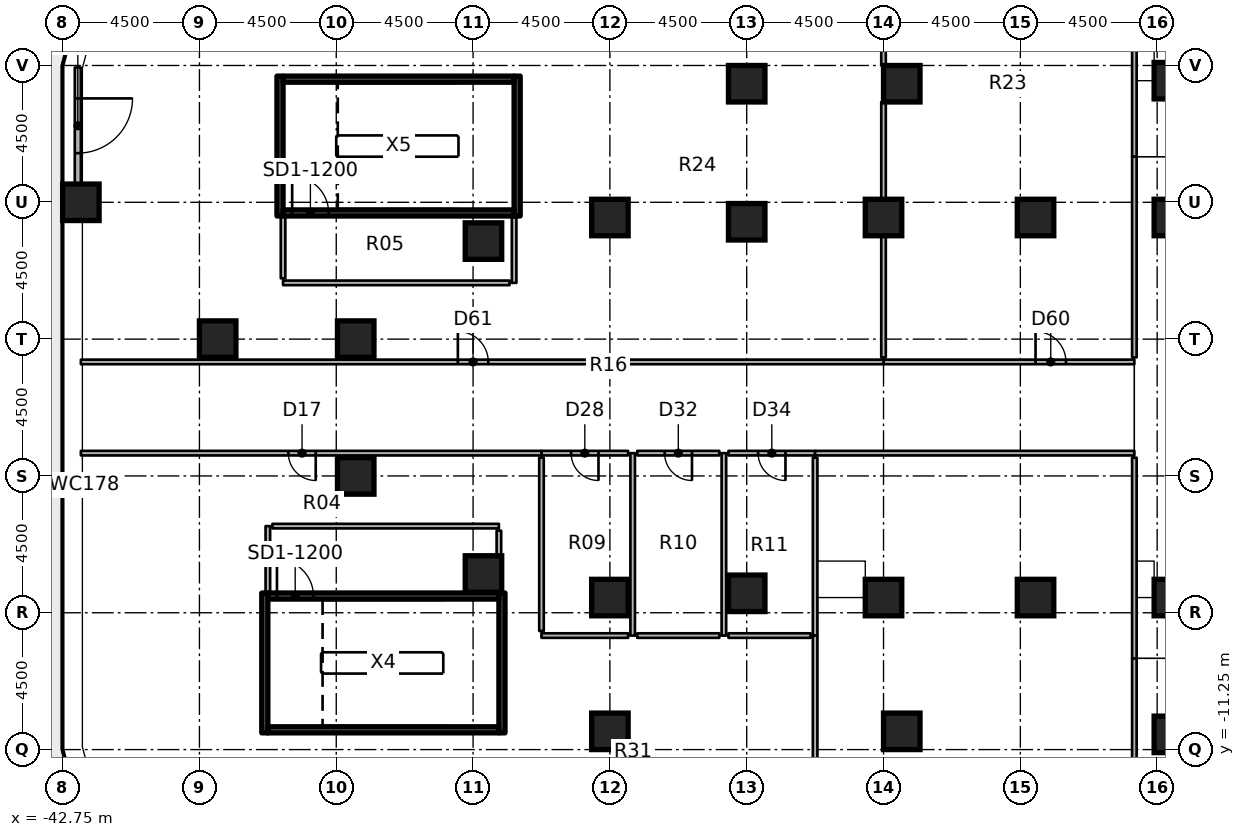
"""IFC4 building model, lengths in metres.
Left out: names, types, materials, properties, quantities, classifications, styles, units other than length and angle.
Written with IfcOpenShell. Run it as: python <this file> out.ifc"""

import sys

from ifc_helpers import new_model, si_unit, direction, frame, frame_2d, origin, origin_2d, place, context, subcontext, project, spatial, rectangle, extrude, element, fill, save


model = new_model("IFC4")
c1 = context("Model", 3, precision=1e-05, world=origin(), true_north=direction((0.0, 1.0)))
c2 = subcontext(c1, "Body", "Model", "MODEL_VIEW")
j1 = project(units=[si_unit("LENGTHUNIT", "METRE"), si_unit("PLANEANGLEUNIT", "RADIAN")], contexts=[c1])
p1 = place(None, origin())
s1 = spatial("IfcSite", under=j1, at=p1, CompositionType="ELEMENT")
p2 = place(p1, origin())
s2 = spatial("IfcBuilding", under=s1, at=p2, CompositionType="ELEMENT")
p3 = place(p2, frame((0.0, 0.0, 17.0)))
s3 = spatial("IfcBuildingStorey", under=s2, at=p3, CompositionType="ELEMENT", Elevation=17.0)
for number, where, z_axis, x_axis in (
    (1, (-42.15, 6.75, 0.0), (0.0, 0.0, 1.0), (1.0, 0.0, 0.0)),
    (2, (-37.65, 2.25, 0.0), (0.0, 0.0, 1.0), (1.0, 0.0, 0.0)),
    (3, (-33.11, -2.25, 0.0), (0.0, 0.0, 1.0), (1.0, 0.0, 0.0)),
    (4, (-33.11, 2.25, 0.0), (0.0, 0.0, 1.0), (1.0, 0.0, 0.0)),
    (5, (-28.908, -5.475, 0.0), (0.0, 0.0, 1.0), (1.0, 0.0, 0.0)),
    (6, (-28.908, 5.475, 0.0), (0.0, 0.0, 1.0), (1.0, 0.0, 0.0)),
    (7, (-24.75, -10.65, 0.0), (0.0, 0.0, 1.0), (1.0, 0.0, 0.0)),
    (8, (-24.75, -6.25, 0.0), (0.0, 0.0, 1.0), (1.0, 0.0, 0.0)),
    (9, (-24.75, 6.25, 0.0), (0.0, 0.0, 1.0), (1.0, 0.0, 0.0)),
    (10, (-20.25, -6.11, 0.0), (0.0, 0.0, 1.0), (1.0, 0.0, 0.0)),
    (11, (-20.25, 6.11, 0.0), (0.0, 0.0, 1.0), (1.0, 0.0, 0.0)),
    (12, (-20.25, 10.65, 0.0), (0.0, 0.0, 1.0), (1.0, 0.0, 0.0)),
    (13, (-15.15, -10.65, 0.0), (0.0, 0.0, 1.0), (1.0, 0.0, 0.0)),
    (14, (-15.75, -6.25, 0.0), (0.0, 0.0, 1.0), (1.0, 0.0, 0.0)),
    (15, (-15.75, 6.25, 0.0), (0.0, 0.0, 1.0), (1.0, 0.0, 0.0)),
    (16, (-15.15, 10.65, 0.0), (0.0, 0.0, 1.0), (1.0, 0.0, 0.0)),
    (17, (-10.75, -6.25, 0.0), (0.0, 0.0, 1.0), (1.0, 0.0, 0.0)),
    (18, (-10.75, 6.25, 0.0), (0.0, 0.0, 1.0), (1.0, 0.0, 0.0)),
    (19, (-6.25, -10.75, 0.0), (0.0, 0.0, 1.0), (1.0, 0.0, 0.0)),
    (20, (-6.25, -6.25, 0.0), (0.0, 0.0, 1.0), (1.0, 0.0, 0.0)),
    (21, (-6.25, 6.25, 0.0), (0.0, 0.0, 1.0), (1.0, 0.0, 0.0)),
    (22, (-6.25, 10.75, 0.0), (0.0, 0.0, 1.0), (1.0, 0.0, 0.0)),
):
    element("IfcColumn", number, at=place(p3, frame(where, z_axis=z_axis, x_axis=x_axis)), inside=s3, PredefinedType="COLUMN", context=c2, shape_type="SweptSolid", body=[
        extrude(rectangle(XDim=1.2, YDim=1.2, at=origin_2d()), origin(), (0.0, 0.0, 1.0), 4.55),
    ])
p4 = place(p3, frame((-42.25, 11.184, 0.0), z_axis=(0.0, 0.0, 1.0), x_axis=(0.0, -1.0, 0.0)))
e23 = element("IfcWall", 23, at=p4, inside=s3, PredefinedType="SOLIDWALL", context=c2, shape_type="SweptSolid", body=[
    extrude(rectangle(XDim=3.834, YDim=0.2, at=frame_2d((1.917, 0.0))), origin(), (0.0, 0.0, 1.0), 4.55),
])
p5 = place(p4, frame((1.017, 0.0, 0.0)))
e24 = element("IfcOpeningElement", 24, at=p5, cuts=e23, PredefinedType="OPENING", context=c2, shape_type="SweptSolid", body=[
    extrude(rectangle(XDim=1.8, YDim=2.4, at=frame_2d((0.9, 1.2))), frame((0.0, 0.11, 0.0), z_axis=(0.0, -1.0, 0.0), x_axis=(1.0, 0.0, 0.0)), (0.0, 0.0, 1.0), 0.22),
])
for number, where, z_axis, x_axis in (
    (25, (-36.1, -10.7, 0.0), (0.0, 0.0, 1.0), (0.0, 1.0, 0.0)),
    (26, (-28.3, -10.7, 0.0), (0.0, 0.0, 1.0), (0.0, 1.0, 0.0)),
):
    element("IfcWall", number, at=place(p3, frame(where, z_axis=z_axis, x_axis=x_axis)), inside=s3, PredefinedType="SHEAR", context=c2, shape_type="SweptSolid", body=[
        extrude(rectangle(XDim=4.6, YDim=0.2, at=frame_2d((2.3, 0.0))), origin(), (0.0, 0.0, 1.0), 4.55),
    ])
p6 = place(p3, frame((-36.0, -10.6, 0.0), z_axis=(0.0, 0.0, 1.0), x_axis=(1.0, 0.0, 0.0)))
e27 = element("IfcWall", 27, at=p6, inside=s3, PredefinedType="SHEAR", context=c2, shape_type="SweptSolid", body=[
    extrude(rectangle(XDim=7.6, YDim=0.2, at=frame_2d((3.8, 0.0))), origin(), (0.0, 0.0, 1.0), 4.55),
])
p7 = place(p3, frame((-36.0, -6.2, 0.0), z_axis=(0.0, 0.0, 1.0), x_axis=(1.0, 0.0, 0.0)))
e28 = element("IfcWall", 28, at=p7, inside=s3, PredefinedType="SHEAR", context=c2, shape_type="SweptSolid", body=[
    extrude(rectangle(XDim=7.6, YDim=0.2, at=frame_2d((3.8, 0.0))), origin(), (0.0, 0.0, 1.0), 4.55),
])
p8 = place(p7, frame((0.3, 0.0, 0.0)))
e29 = element("IfcOpeningElement", 29, at=p8, cuts=e28, PredefinedType="OPENING", context=c2, shape_type="SweptSolid", body=[
    extrude(rectangle(XDim=1.2, YDim=2.1, at=frame_2d((0.6, 1.05))), frame((0.0, 0.11, 0.0), z_axis=(0.0, -1.0, 0.0), x_axis=(1.0, 0.0, 0.0)), (0.0, 0.0, 1.0), 0.22),
])
for number, where, z_axis, x_axis in (
    (30, (-35.6, 6.3, 0.0), (0.0, 0.0, 1.0), (0.0, 1.0, 0.0)),
    (31, (-27.8, 6.3, 0.0), (0.0, 0.0, 1.0), (0.0, 1.0, 0.0)),
):
    element("IfcWall", number, at=place(p3, frame(where, z_axis=z_axis, x_axis=x_axis)), inside=s3, PredefinedType="SHEAR", context=c2, shape_type="SweptSolid", body=[
        extrude(rectangle(XDim=4.6, YDim=0.2, at=frame_2d((2.3, 0.0))), origin(), (0.0, 0.0, 1.0), 4.55),
    ])
p9 = place(p3, frame((-35.5, 6.4, 0.0), z_axis=(0.0, 0.0, 1.0), x_axis=(1.0, 0.0, 0.0)))
e32 = element("IfcWall", 32, at=p9, inside=s3, PredefinedType="SHEAR", context=c2, shape_type="SweptSolid", body=[
    extrude(rectangle(XDim=7.6, YDim=0.2, at=frame_2d((3.8, 0.0))), origin(), (0.0, 0.0, 1.0), 4.55),
])
p10 = place(p9, frame((0.3, 0.0, 0.0)))
e33 = element("IfcOpeningElement", 33, at=p10, cuts=e32, PredefinedType="OPENING", context=c2, shape_type="SweptSolid", body=[
    extrude(rectangle(XDim=1.2, YDim=2.1, at=frame_2d((0.6, 1.05))), frame((0.0, 0.11, 0.0), z_axis=(0.0, -1.0, 0.0), x_axis=(1.0, 0.0, 0.0)), (0.0, 0.0, 1.0), 0.22),
])
p11 = place(p3, frame((-35.5, 10.8, 0.0), z_axis=(0.0, 0.0, 1.0), x_axis=(1.0, 0.0, 0.0)))
e34 = element("IfcWall", 34, at=p11, inside=s3, PredefinedType="SHEAR", context=c2, shape_type="SweptSolid", body=[
    extrude(rectangle(XDim=7.6, YDim=0.2, at=frame_2d((3.8, 0.0))), origin(), (0.0, 0.0, 1.0), 4.55),
])
p12 = place(p3, frame((-36.0, -6.1, 0.0), z_axis=(0.0, 0.0, 1.0), x_axis=(0.0, 1.0, 0.0)))
e35 = element("IfcWall", 35, at=p12, inside=s3, PredefinedType="PARTITIONING", context=c2, shape_type="SweptSolid", body=[
    extrude(rectangle(XDim=2.2, YDim=0.15, at=frame_2d((1.1, 0.0))), origin(), (0.0, 0.0, 1.0), 4.55),
])
p13 = place(p3, frame((-35.85, -3.9, 0.0), z_axis=(0.0, 0.0, 1.0), x_axis=(1.0, 0.0, 0.0)))
e36 = element("IfcWall", 36, at=p13, inside=s3, PredefinedType="PARTITIONING", context=c2, shape_type="SweptSolid", body=[
    extrude(rectangle(XDim=7.45, YDim=0.15, at=frame_2d((3.725, 0.0))), origin(), (0.0, 0.0, 1.0), 4.55),
])
p14 = place(p3, frame((-28.4, -4.05, 0.0), z_axis=(0.0, 0.0, 1.0), x_axis=(0.0, -1.0, 0.0)))
e37 = element("IfcWall", 37, at=p14, inside=s3, PredefinedType="PARTITIONING", context=c2, shape_type="SweptSolid", body=[
    extrude(rectangle(XDim=0.825, YDim=0.15, at=frame_2d((0.413, 0.0))), origin(), (0.0, 0.0, 1.0), 4.55),
])
p15 = place(p3, frame((-27.9, 6.3, 0.0), z_axis=(0.0, 0.0, 1.0), x_axis=(0.0, -1.0, 0.0)))
e38 = element("IfcWall", 38, at=p15, inside=s3, PredefinedType="PARTITIONING", context=c2, shape_type="SweptSolid", body=[
    extrude(rectangle(XDim=2.2, YDim=0.15, at=frame_2d((1.1, 0.0))), origin(), (0.0, 0.0, 1.0), 4.55),
])
p16 = place(p3, frame((-28.05, 4.1, 0.0), z_axis=(0.0, 0.0, 1.0), x_axis=(-1.0, 0.0, 0.0)))
e39 = element("IfcWall", 39, at=p16, inside=s3, PredefinedType="PARTITIONING", context=c2, shape_type="SweptSolid", body=[
    extrude(rectangle(XDim=7.45, YDim=0.15, at=frame_2d((3.725, 0.0))), origin(), (0.0, 0.0, 1.0), 4.55),
])
p17 = place(p3, frame((-35.5, 4.25, 0.0), z_axis=(0.0, 0.0, 1.0), x_axis=(0.0, 1.0, 0.0)))
e40 = element("IfcWall", 40, at=p17, inside=s3, PredefinedType="PARTITIONING", context=c2, shape_type="SweptSolid", body=[
    extrude(rectangle(XDim=2.05, YDim=0.15, at=frame_2d((1.025, 0.0))), origin(), (0.0, 0.0, 1.0), 4.55),
])
p18 = place(p3, frame((-24.0, -1.5, 0.0), z_axis=(0.0, 0.0, 1.0), x_axis=(0.0, -1.0, 0.0)))
e41 = element("IfcWall", 41, at=p18, inside=s3, PredefinedType="PARTITIONING", context=c2, shape_type="SweptSolid", body=[
    extrude(rectangle(XDim=6.0, YDim=0.15, at=frame_2d((3.0, 0.0))), origin(), (0.0, 0.0, 1.0), 4.55),
])
p19 = place(p3, frame((-24.15, -1.5, 0.0), z_axis=(0.0, 0.0, 1.0), x_axis=(-1.0, 0.0, 0.0)))
e42 = element("IfcWall", 42, at=p19, inside=s3, PredefinedType="PARTITIONING", context=c2, shape_type="SweptSolid", body=[
    extrude(rectangle(XDim=2.85, YDim=0.15, at=frame_2d((1.425, 0.0))), origin(), (0.0, 0.0, 1.0), 4.55),
])
p20 = place(p19, frame((0.975, 0.0, 0.0)))
e43 = element("IfcOpeningElement", 43, at=p20, cuts=e42, PredefinedType="OPENING", context=c2, shape_type="SweptSolid", body=[
    extrude(rectangle(XDim=0.9, YDim=2.1, at=frame_2d((0.45, 1.05))), frame((0.0, 0.085, 0.0), z_axis=(0.0, -1.0, 0.0), x_axis=(1.0, 0.0, 0.0)), (0.0, 0.0, 1.0), 0.17),
])
p21 = place(p3, frame((-24.15, -7.5, 0.0), z_axis=(0.0, 0.0, 1.0), x_axis=(-1.0, 0.0, 0.0)))
e44 = element("IfcWall", 44, at=p21, inside=s3, PredefinedType="PARTITIONING", context=c2, shape_type="SweptSolid", body=[
    extrude(rectangle(XDim=2.85, YDim=0.15, at=frame_2d((1.425, 0.0))), origin(), (0.0, 0.0, 1.0), 4.55),
])
p22 = place(p3, frame((-27.0, -7.35, 0.0), z_axis=(0.0, 0.0, 1.0), x_axis=(0.0, 1.0, 0.0)))
e45 = element("IfcWall", 45, at=p22, inside=s3, PredefinedType="PARTITIONING", context=c2, shape_type="SweptSolid", body=[
    extrude(rectangle(XDim=5.7, YDim=0.15, at=frame_2d((2.85, 0.0))), origin(), (0.0, 0.0, 1.0), 4.55),
])
p23 = place(p3, frame((-21.0, -1.5, 0.0), z_axis=(0.0, 0.0, 1.0), x_axis=(0.0, -1.0, 0.0)))
e46 = element("IfcWall", 46, at=p23, inside=s3, PredefinedType="PARTITIONING", context=c2, shape_type="SweptSolid", body=[
    extrude(rectangle(XDim=6.0, YDim=0.15, at=frame_2d((3.0, 0.0))), origin(), (0.0, 0.0, 1.0), 4.55),
])
p24 = place(p3, frame((-21.15, -1.5, 0.0), z_axis=(0.0, 0.0, 1.0), x_axis=(-1.0, 0.0, 0.0)))
e47 = element("IfcWall", 47, at=p24, inside=s3, PredefinedType="PARTITIONING", context=c2, shape_type="SweptSolid", body=[
    extrude(rectangle(XDim=2.7, YDim=0.15, at=frame_2d((1.35, 0.0))), origin(), (0.0, 0.0, 1.0), 4.55),
])
p25 = place(p24, frame((0.9, 0.0, 0.0)))
e48 = element("IfcOpeningElement", 48, at=p25, cuts=e47, PredefinedType="OPENING", context=c2, shape_type="SweptSolid", body=[
    extrude(rectangle(XDim=0.9, YDim=2.1, at=frame_2d((0.45, 1.05))), frame((0.0, 0.085, 0.0), z_axis=(0.0, -1.0, 0.0), x_axis=(1.0, 0.0, 0.0)), (0.0, 0.0, 1.0), 0.17),
])
p26 = place(p3, frame((-21.15, -7.5, 0.0), z_axis=(0.0, 0.0, 1.0), x_axis=(-1.0, 0.0, 0.0)))
e49 = element("IfcWall", 49, at=p26, inside=s3, PredefinedType="PARTITIONING", context=c2, shape_type="SweptSolid", body=[
    extrude(rectangle(XDim=2.7, YDim=0.15, at=frame_2d((1.35, 0.0))), origin(), (0.0, 0.0, 1.0), 4.55),
])
p27 = place(p3, frame((-18.0, -1.5, 0.0), z_axis=(0.0, 0.0, 1.0), x_axis=(-1.0, 0.0, 0.0)))
e50 = element("IfcWall", 50, at=p27, inside=s3, PredefinedType="PARTITIONING", context=c2, shape_type="SweptSolid", body=[
    extrude(rectangle(XDim=2.85, YDim=0.15, at=frame_2d((1.425, 0.0))), origin(), (0.0, 0.0, 1.0), 4.55),
])
p28 = place(p27, frame((0.975, 0.0, 0.0)))
e51 = element("IfcOpeningElement", 51, at=p28, cuts=e50, PredefinedType="OPENING", context=c2, shape_type="SweptSolid", body=[
    extrude(rectangle(XDim=0.9, YDim=2.1, at=frame_2d((0.45, 1.05))), frame((0.0, 0.085, 0.0), z_axis=(0.0, -1.0, 0.0), x_axis=(1.0, 0.0, 0.0)), (0.0, 0.0, 1.0), 0.17),
])
p29 = place(p3, frame((-18.0, -1.65, 0.0), z_axis=(0.0, 0.0, 1.0), x_axis=(0.0, -1.0, 0.0)))
e52 = element("IfcWall", 52, at=p29, inside=s3, PredefinedType="PARTITIONING", context=c2, shape_type="SweptSolid", body=[
    extrude(rectangle(XDim=5.85, YDim=0.15, at=frame_2d((2.925, 0.0))), origin(), (0.0, 0.0, 1.0), 4.55),
])
p30 = place(p3, frame((-18.15, -7.5, 0.0), z_axis=(0.0, 0.0, 1.0), x_axis=(-1.0, 0.0, 0.0)))
e53 = element("IfcWall", 53, at=p30, inside=s3, PredefinedType="PARTITIONING", context=c2, shape_type="SweptSolid", body=[
    extrude(rectangle(XDim=2.7, YDim=0.15, at=frame_2d((1.35, 0.0))), origin(), (0.0, 0.0, 1.0), 4.55),
])
p31 = place(p3, frame((-7.5, 8.25, 0.0), z_axis=(0.0, 0.0, 1.0), x_axis=(0.0, 1.0, 0.0)))
e54 = element("IfcWall", 54, at=p31, inside=s3, PredefinedType="PARTITIONING", context=c2, shape_type="SweptSolid", body=[
    extrude(rectangle(XDim=12.0, YDim=0.15, at=frame_2d((6.0, 0.0))), origin(), (0.0, 0.0, 1.0), 4.55),
])
p32 = place(p31, frame((3.5, 0.0, 0.0)))
e55 = element("IfcOpeningElement", 55, at=p32, cuts=e54, PredefinedType="OPENING", context=c2, shape_type="SweptSolid", body=[
    extrude(rectangle(XDim=1.0, YDim=2.1, at=frame_2d((0.5, 1.05))), frame((0.0, 0.085, 0.0), z_axis=(0.0, -1.0, 0.0), x_axis=(1.0, 0.0, 0.0)), (0.0, 0.0, 1.0), 0.17),
])
p33 = place(p3, frame((-7.5, -20.25, 0.0), z_axis=(0.0, 0.0, 1.0), x_axis=(0.0, 1.0, 0.0)))
e56 = element("IfcWall", 56, at=p33, inside=s3, PredefinedType="PARTITIONING", context=c2, shape_type="SweptSolid", body=[
    extrude(rectangle(XDim=12.0, YDim=0.15, at=frame_2d((6.0, 0.0))), origin(), (0.0, 0.0, 1.0), 4.55),
])
p34 = place(p33, frame((5.5, 0.0, 0.0)))
e57 = element("IfcOpeningElement", 57, at=p34, cuts=e56, PredefinedType="OPENING", context=c2, shape_type="SweptSolid", body=[
    extrude(rectangle(XDim=1.0, YDim=2.1, at=frame_2d((0.5, 1.05))), frame((0.0, 0.085, 0.0), z_axis=(0.0, -1.0, 0.0), x_axis=(1.0, 0.0, 0.0)), (0.0, 0.0, 1.0), 0.17),
])
p35 = place(p3, frame((-15.75, 1.5, 0.0), z_axis=(0.0, 0.0, 1.0), x_axis=(1.0, 0.0, 0.0)))
e58 = element("IfcWall", 58, at=p35, inside=s3, PredefinedType="PARTITIONING", context=c2, shape_type="SweptSolid", body=[
    extrude(rectangle(XDim=8.25, YDim=0.15, at=frame_2d((4.125, 0.0))), origin(), (0.0, 0.0, 1.0), 4.55),
])
p36 = place(p35, frame((5.0, 0.0, 0.0)))
e59 = element("IfcOpeningElement", 59, at=p36, cuts=e58, PredefinedType="OPENING", context=c2, shape_type="SweptSolid", body=[
    extrude(rectangle(XDim=1.0, YDim=2.1, at=frame_2d((0.5, 1.05))), frame((0.0, 0.085, 0.0), z_axis=(0.0, -1.0, 0.0), x_axis=(1.0, 0.0, 0.0)), (0.0, 0.0, 1.0), 0.17),
])
p37 = place(p3, frame((-42.15, 1.5, 0.0), z_axis=(0.0, 0.0, 1.0), x_axis=(1.0, 0.0, 0.0)))
e60 = element("IfcWall", 60, at=p37, inside=s3, PredefinedType="PARTITIONING", context=c2, shape_type="SweptSolid", body=[
    extrude(rectangle(XDim=26.4, YDim=0.15, at=frame_2d((13.2, 0.0))), origin(), (0.0, 0.0, 1.0), 4.55),
])
p38 = place(p37, frame((12.4, 0.0, 0.0)))
e61 = element("IfcOpeningElement", 61, at=p38, cuts=e60, PredefinedType="OPENING", context=c2, shape_type="SweptSolid", body=[
    extrude(rectangle(XDim=1.0, YDim=2.1, at=frame_2d((0.5, 1.05))), frame((0.0, 0.085, 0.0), z_axis=(0.0, -1.0, 0.0), x_axis=(1.0, 0.0, 0.0)), (0.0, 0.0, 1.0), 0.17),
])
p39 = place(p3, frame((-7.5, -1.5, 0.0), z_axis=(0.0, 0.0, 1.0), x_axis=(-1.0, 0.0, 0.0)))
e62 = element("IfcWall", 62, at=p39, inside=s3, PredefinedType="PARTITIONING", context=c2, shape_type="SweptSolid", body=[
    extrude(rectangle(XDim=10.5, YDim=0.15, at=frame_2d((5.25, 0.0))), origin(), (0.0, 0.0, 1.0), 4.55),
])
p40 = place(p3, frame((-27.0, -1.5, 0.0), z_axis=(0.0, 0.0, 1.0), x_axis=(-1.0, 0.0, 0.0)))
e63 = element("IfcWall", 63, at=p40, inside=s3, PredefinedType="PARTITIONING", context=c2, shape_type="SweptSolid", body=[
    extrude(rectangle(XDim=15.15, YDim=0.15, at=frame_2d((7.575, 0.0))), origin(), (0.0, 0.0, 1.0), 4.55),
])
p41 = place(p40, frame((7.425, 0.0, 0.0)))
e64 = element("IfcOpeningElement", 64, at=p41, cuts=e63, PredefinedType="OPENING", context=c2, shape_type="SweptSolid", body=[
    extrude(rectangle(XDim=0.9, YDim=2.1, at=frame_2d((0.45, 1.05))), frame((0.0, 0.085, 0.0), z_axis=(0.0, -1.0, 0.0), x_axis=(1.0, 0.0, 0.0)), (0.0, 0.0, 1.0), 0.17),
])
p42 = place(p3, frame((-15.75, 1.65, 0.0), z_axis=(0.0, 0.0, 1.0), x_axis=(0.0, 1.0, 0.0)))
e65 = element("IfcWall", 65, at=p42, inside=s3, PredefinedType="PARTITIONING", context=c2, shape_type="SweptSolid", body=[
    extrude(rectangle(XDim=4.0, YDim=0.15, at=frame_2d((2.0, 0.0))), origin(), (0.0, 0.0, 1.0), 4.55),
])
p43 = place(p3, frame((-15.75, 6.85, 0.0), z_axis=(0.0, 0.0, 1.0), x_axis=(0.0, 1.0, 0.0)))
e66 = element("IfcWall", 66, at=p43, inside=s3, PredefinedType="PARTITIONING", context=c2, shape_type="SweptSolid", body=[
    extrude(rectangle(XDim=3.2, YDim=0.15, at=frame_2d((1.6, 0.0))), origin(), (0.0, 0.0, 1.0), 4.55),
])
p44 = place(p3, frame((-15.75, 11.25, 0.0), z_axis=(0.0, 0.0, 1.0), x_axis=(0.0, 1.0, 0.0)))
e67 = element("IfcWall", 67, at=p44, inside=s3, PredefinedType="PARTITIONING", context=c2, shape_type="SweptSolid", body=[
    extrude(rectangle(XDim=7.8, YDim=0.15, at=frame_2d((3.9, 0.0))), origin(), (0.0, 0.0, 1.0), 4.55),
])
p45 = place(p3, frame((-7.5, 8.25, 0.0), z_axis=(0.0, 0.0, 1.0), x_axis=(0.0, -1.0, 0.0)))
e68 = element("IfcWall", 68, at=p45, inside=s3, PredefinedType="PARTITIONING", context=c2, shape_type="SweptSolid", body=[
    extrude(rectangle(XDim=6.6, YDim=0.15, at=frame_2d((3.3, 0.0))), origin(), (0.0, 0.0, 1.0), 4.55),
])
p46 = place(p3, frame((-18.0, -18.797, 0.0), z_axis=(0.0, 0.0, 1.0), x_axis=(0.0, 1.0, 0.0)))
e69 = element("IfcWall", 69, at=p46, inside=s3, PredefinedType="PARTITIONING", context=c2, shape_type="SweptSolid", body=[
    extrude(rectangle(XDim=11.297, YDim=0.15, at=frame_2d((5.648, 0.0))), origin(), (0.0, 0.0, 1.0), 4.55),
])
p47 = place(p3, frame((-7.5, -1.65, 0.0), z_axis=(0.0, 0.0, 1.0), x_axis=(0.0, -1.0, 0.0)))
e70 = element("IfcWall", 70, at=p47, inside=s3, PredefinedType="PARTITIONING", context=c2, shape_type="SweptSolid", body=[
    extrude(rectangle(XDim=6.6, YDim=0.15, at=frame_2d((3.3, 0.0))), origin(), (0.0, 0.0, 1.0), 4.55),
])
p48 = place(p5, origin())
e71 = element("IfcDoor", 71, at=p48, inside=s3, OperationType="SINGLE_SWING_LEFT", PredefinedType="DOOR", context=c2, shape_type="SweptSolid", body=[
    extrude(rectangle(XDim=1.8, YDim=2.4, at=frame_2d((0.9, 1.2))), frame((0.0, 0.025, 0.0), z_axis=(0.0, -1.0, 0.0), x_axis=(1.0, 0.0, 0.0)), (0.0, 0.0, 1.0), 0.05),
])
fill(e24, e71)
p49 = place(p8, origin())
e72 = element("IfcDoor", 72, at=p49, inside=s3, OperationType="SINGLE_SWING_RIGHT", PredefinedType="DOOR", context=c2, shape_type="SweptSolid", body=[
    extrude(rectangle(XDim=1.2, YDim=2.1, at=frame_2d((0.6, 1.05))), frame((0.0, 0.025, 0.0), z_axis=(0.0, -1.0, 0.0), x_axis=(1.0, 0.0, 0.0)), (0.0, 0.0, 1.0), 0.05),
])
fill(e29, e72)
p50 = place(p10, origin())
e73 = element("IfcDoor", 73, at=p50, inside=s3, OperationType="SINGLE_SWING_RIGHT", PredefinedType="DOOR", context=c2, shape_type="SweptSolid", body=[
    extrude(rectangle(XDim=1.2, YDim=2.1, at=frame_2d((0.6, 1.05))), frame((0.0, 0.025, 0.0), z_axis=(0.0, -1.0, 0.0), x_axis=(1.0, 0.0, 0.0)), (0.0, 0.0, 1.0), 0.05),
])
fill(e33, e73)
p51 = place(p20, origin())
e74 = element("IfcDoor", 74, at=p51, inside=s3, OperationType="SINGLE_SWING_LEFT", PredefinedType="DOOR", context=c2, shape_type="SweptSolid", body=[
    extrude(rectangle(XDim=0.9, YDim=2.1, at=frame_2d((0.45, 1.05))), frame((0.0, 0.025, 0.0), z_axis=(0.0, -1.0, 0.0), x_axis=(1.0, 0.0, 0.0)), (0.0, 0.0, 1.0), 0.05),
])
fill(e43, e74)
p52 = place(p25, origin())
e75 = element("IfcDoor", 75, at=p52, inside=s3, OperationType="SINGLE_SWING_LEFT", PredefinedType="DOOR", context=c2, shape_type="SweptSolid", body=[
    extrude(rectangle(XDim=0.9, YDim=2.1, at=frame_2d((0.45, 1.05))), frame((0.0, 0.025, 0.0), z_axis=(0.0, -1.0, 0.0), x_axis=(1.0, 0.0, 0.0)), (0.0, 0.0, 1.0), 0.05),
])
fill(e48, e75)
p53 = place(p28, origin())
e76 = element("IfcDoor", 76, at=p53, inside=s3, OperationType="SINGLE_SWING_LEFT", PredefinedType="DOOR", context=c2, shape_type="SweptSolid", body=[
    extrude(rectangle(XDim=0.9, YDim=2.1, at=frame_2d((0.45, 1.05))), frame((0.0, 0.025, 0.0), z_axis=(0.0, -1.0, 0.0), x_axis=(1.0, 0.0, 0.0)), (0.0, 0.0, 1.0), 0.05),
])
fill(e51, e76)
p54 = place(p36, origin())
e77 = element("IfcDoor", 77, at=p54, inside=s3, OperationType="SINGLE_SWING_LEFT", PredefinedType="DOOR", context=c2, shape_type="SweptSolid", body=[
    extrude(rectangle(XDim=1.0, YDim=2.1, at=frame_2d((0.5, 1.05))), frame((0.0, 0.025, 0.0), z_axis=(0.0, -1.0, 0.0), x_axis=(1.0, 0.0, 0.0)), (0.0, 0.0, 1.0), 0.05),
])
fill(e59, e77)
p55 = place(p38, origin())
e78 = element("IfcDoor", 78, at=p55, inside=s3, OperationType="SINGLE_SWING_LEFT", PredefinedType="DOOR", context=c2, shape_type="SweptSolid", body=[
    extrude(rectangle(XDim=1.0, YDim=2.1, at=frame_2d((0.5, 1.05))), frame((0.0, 0.025, 0.0), z_axis=(0.0, -1.0, 0.0), x_axis=(1.0, 0.0, 0.0)), (0.0, 0.0, 1.0), 0.05),
])
fill(e61, e78)
p56 = place(p41, origin())
e79 = element("IfcDoor", 79, at=p56, inside=s3, OperationType="SINGLE_SWING_LEFT", PredefinedType="DOOR", context=c2, shape_type="SweptSolid", body=[
    extrude(rectangle(XDim=0.9, YDim=2.1, at=frame_2d((0.45, 1.05))), frame((0.0, 0.025, 0.0), z_axis=(0.0, -1.0, 0.0), x_axis=(1.0, 0.0, 0.0)), (0.0, 0.0, 1.0), 0.05),
])
fill(e64, e79)
save(model, sys.argv[1])
